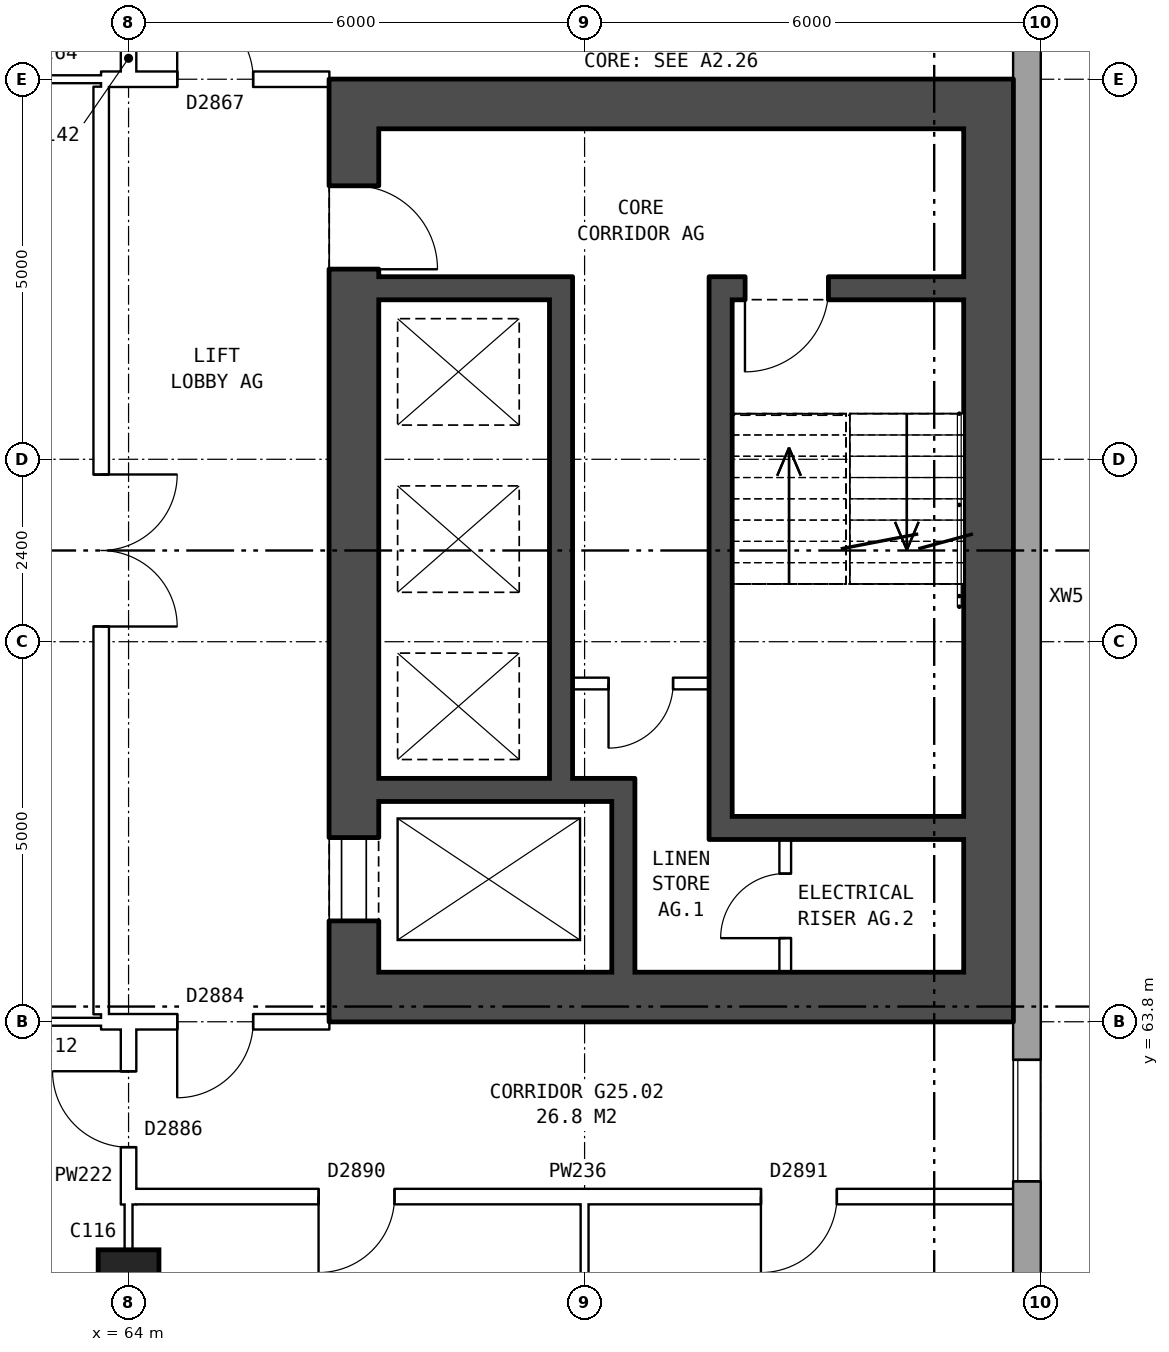
"""IFC4 building model, lengths in metres.
Left out: names, types, materials, properties, quantities, classifications, styles, units other than length and angle.
Written with IfcOpenShell. Run it as: python <this file> out.ifc"""

import sys

from ifc_helpers import new_model, si_unit, direction, frame, frame_2d, origin, origin_2d, place, context, subcontext, project, spatial, rectangle, extrude, element, fill, save


model = new_model("IFC4")
c1 = context("Model", 3, precision=1e-05, world=origin(), true_north=direction((0.0, 1.0)))
c2 = subcontext(c1, "Body", "Model", "MODEL_VIEW")
j1 = project(units=[si_unit("LENGTHUNIT", "METRE"), si_unit("PLANEANGLEUNIT", "RADIAN")], contexts=[c1])
p1 = place(None, origin())
s1 = spatial("IfcSite", under=j1, at=p1, CompositionType="ELEMENT")
p2 = place(p1, origin())
s2 = spatial("IfcBuilding", under=s1, at=p2, CompositionType="ELEMENT")
p3 = place(p2, frame((0.0, 0.0, 90.2)))
s3 = spatial("IfcBuildingStorey", under=s2, at=p3, CompositionType="ELEMENT", Elevation=90.2)
p4 = place(p3, frame((64.0, 60.4, 0.0), z_axis=(0.0, 0.0, 1.0), x_axis=(1.0, 0.0, 0.0)))
e1 = element("IfcColumn", 1, at=p4, inside=s3, PredefinedType="COLUMN", context=c2, shape_type="SweptSolid", body=[
    extrude(rectangle(XDim=0.8, YDim=0.8, at=origin_2d()), origin(), (0.0, 0.0, 1.0), 5.6),
])
p5 = place(p3, frame((75.82, 57.075, 0.0), z_axis=(0.0, 0.0, 1.0), x_axis=(0.0, 1.0, 0.0)))
e2 = element("IfcWall", 2, at=p5, inside=s3, PredefinedType="STANDARD", context=c2, shape_type="SweptSolid", body=[
    extrude(rectangle(XDim=25.851, YDim=0.36, at=frame_2d((12.925, 0.0))), origin(), (0.0, 0.0, 1.0), 5.6),
])
p6 = place(p5, frame((1.625, 0.0, 0.15)))
e3 = element("IfcOpeningElement", 3, at=p6, cuts=e2, PredefinedType="OPENING", context=c2, shape_type="SweptSolid", body=[
    extrude(rectangle(XDim=1.6, YDim=2.4, at=frame_2d((0.8, 1.2))), frame((0.0, 0.19, 0.0), z_axis=(0.0, -1.0, 0.0), x_axis=(1.0, 0.0, 0.0)), (0.0, 0.0, 1.0), 0.38),
])
p7 = place(p5, frame((4.625, 0.0, 0.15)))
e4 = element("IfcOpeningElement", 4, at=p7, cuts=e2, PredefinedType="OPENING", context=c2, shape_type="SweptSolid", body=[
    extrude(rectangle(XDim=1.6, YDim=2.4, at=frame_2d((0.8, 1.2))), frame((0.0, 0.19, 0.0), z_axis=(0.0, -1.0, 0.0), x_axis=(1.0, 0.0, 0.0)), (0.0, 0.0, 1.0), 0.38),
])
p8 = place(p5, frame((19.625, 0.0, 0.15)))
e5 = element("IfcOpeningElement", 5, at=p8, cuts=e2, PredefinedType="OPENING", context=c2, shape_type="SweptSolid", body=[
    extrude(rectangle(XDim=1.6, YDim=2.4, at=frame_2d((0.8, 1.2))), frame((0.0, 0.19, 0.0), z_axis=(0.0, -1.0, 0.0), x_axis=(1.0, 0.0, 0.0)), (0.0, 0.0, 1.0), 0.38),
])
p9 = place(p5, frame((22.625, 0.0, 0.15)))
e6 = element("IfcOpeningElement", 6, at=p9, cuts=e2, PredefinedType="OPENING", context=c2, shape_type="SweptSolid", body=[
    extrude(rectangle(XDim=1.6, YDim=2.4, at=frame_2d((0.8, 1.2))), frame((0.0, 0.19, 0.0), z_axis=(0.0, -1.0, 0.0), x_axis=(1.0, 0.0, 0.0)), (0.0, 0.0, 1.0), 0.38),
])
p10 = place(p3, frame((66.965, 64.45, 0.0), z_axis=(0.0, 0.0, 1.0), x_axis=(0.0, 1.0, 0.0)))
e7 = element("IfcWall", 7, at=p10, inside=s3, PredefinedType="SHEAR", context=c2, shape_type="SweptSolid", body=[
    extrude(rectangle(XDim=11.1, YDim=0.65, at=frame_2d((5.55, 0.0))), origin(), (0.0, 0.0, 1.0), 5.6),
])
p11 = place(p10, frame((0.675, 0.0, 0.0)))
e8 = element("IfcOpeningElement", 8, at=p11, cuts=e7, PredefinedType="OPENING", context=c2, shape_type="SweptSolid", body=[
    extrude(rectangle(XDim=1.1, YDim=2.1, at=frame_2d((0.55, 1.05))), frame((0.0, 0.335, 0.0), z_axis=(0.0, -1.0, 0.0), x_axis=(1.0, 0.0, 0.0)), (0.0, 0.0, 1.0), 0.67),
])
p12 = place(p10, frame((9.25, 0.0, 0.0)))
e9 = element("IfcOpeningElement", 9, at=p12, cuts=e7, PredefinedType="OPENING", context=c2, shape_type="SweptSolid", body=[
    extrude(rectangle(XDim=1.1, YDim=2.1, at=frame_2d((0.55, 1.05))), frame((0.0, 0.335, 0.0), z_axis=(0.0, -1.0, 0.0), x_axis=(1.0, 0.0, 0.0)), (0.0, 0.0, 1.0), 0.67),
])
p13 = place(p3, frame((75.315, 64.45, 0.0), z_axis=(0.0, 0.0, 1.0), x_axis=(0.0, 1.0, 0.0)))
e10 = element("IfcWall", 10, at=p13, inside=s3, PredefinedType="SHEAR", context=c2, shape_type="SweptSolid", body=[
    extrude(rectangle(XDim=11.1, YDim=0.65, at=frame_2d((5.55, 0.0))), origin(), (0.0, 0.0, 1.0), 5.6),
])
for number, where, z_axis, x_axis in (
    (11, (66.64, 64.125, 0.0), (0.0, 0.0, 1.0), (1.0, 0.0, 0.0)),
    (12, (66.64, 75.875, 0.0), (0.0, 0.0, 1.0), (1.0, 0.0, 0.0)),
):
    element("IfcWall", number, at=place(p3, frame(where, z_axis=z_axis, x_axis=x_axis)), inside=s3, PredefinedType="SHEAR", context=c2, shape_type="SweptSolid", body=[
        extrude(rectangle(XDim=9.0, YDim=0.65, at=frame_2d((4.5, 0.0))), origin(), (0.0, 0.0, 1.0), 5.6),
    ])
p14 = place(p3, frame((71.94, 66.35, 0.0), z_axis=(0.0, 0.0, 1.0), x_axis=(1.0, 0.0, 0.0)))
e13 = element("IfcWall", 13, at=p14, inside=s3, PredefinedType="SHEAR", context=c2, shape_type="SweptSolid", body=[
    extrude(rectangle(XDim=3.05, YDim=0.3, at=frame_2d((1.525, 0.0))), origin(), (0.0, 0.0, 1.0), 5.6),
])
p15 = place(p3, frame((67.29, 66.85, 0.0), z_axis=(0.0, 0.0, 1.0), x_axis=(1.0, 0.0, 0.0)))
e14 = element("IfcWall", 14, at=p15, inside=s3, PredefinedType="SHEAR", context=c2, shape_type="SweptSolid", body=[
    extrude(rectangle(XDim=3.37, YDim=0.3, at=frame_2d((1.685, 0.0))), origin(), (0.0, 0.0, 1.0), 5.6),
])
p16 = place(p3, frame((69.84, 68.25, 0.0), z_axis=(0.0, 0.0, 1.0), x_axis=(1.0, 0.0, 0.0)))
e15 = element("IfcWall", 15, at=p16, inside=s3, PredefinedType="PARTITIONING", context=c2, shape_type="SweptSolid", body=[
    extrude(rectangle(XDim=1.8, YDim=0.15, at=frame_2d((0.9, 0.0))), origin(), (0.0, 0.0, 1.0), 5.6),
])
p17 = place(p16, frame((0.475, 0.0, 0.0)))
e16 = element("IfcOpeningElement", 16, at=p17, cuts=e15, PredefinedType="OPENING", context=c2, shape_type="SweptSolid", body=[
    extrude(rectangle(XDim=0.85, YDim=2.1, at=frame_2d((0.425, 1.05))), frame((0.0, 0.085, 0.0), z_axis=(0.0, -1.0, 0.0), x_axis=(1.0, 0.0, 0.0)), (0.0, 0.0, 1.0), 0.17),
])
p18 = place(p3, frame((67.29, 73.45, 0.0), z_axis=(0.0, 0.0, 1.0), x_axis=(1.0, 0.0, 0.0)))
e17 = element("IfcWall", 17, at=p18, inside=s3, PredefinedType="SHEAR", context=c2, shape_type="SweptSolid", body=[
    extrude(rectangle(XDim=2.25, YDim=0.3, at=frame_2d((1.125, 0.0))), origin(), (0.0, 0.0, 1.0), 5.6),
])
p19 = place(p3, frame((71.94, 73.45, 0.0), z_axis=(0.0, 0.0, 1.0), x_axis=(1.0, 0.0, 0.0)))
e18 = element("IfcWall", 18, at=p19, inside=s3, PredefinedType="SHEAR", context=c2, shape_type="SweptSolid", body=[
    extrude(rectangle(XDim=3.05, YDim=0.3, at=frame_2d((1.525, 0.0))), origin(), (0.0, 0.0, 1.0), 5.6),
])
p20 = place(p19, frame((0.17, 0.0, 0.0)))
e19 = element("IfcOpeningElement", 19, at=p20, cuts=e18, PredefinedType="OPENING", context=c2, shape_type="SweptSolid", body=[
    extrude(rectangle(XDim=1.1, YDim=2.1, at=frame_2d((0.55, 1.05))), frame((0.0, 0.16, 0.0), z_axis=(0.0, -1.0, 0.0), x_axis=(1.0, 0.0, 0.0)), (0.0, 0.0, 1.0), 0.32),
])
p21 = place(p3, frame((69.69, 67.0, 0.0), z_axis=(0.0, 0.0, 1.0), x_axis=(0.0, 1.0, 0.0)))
e20 = element("IfcWall", 20, at=p21, inside=s3, PredefinedType="SHEAR", context=c2, shape_type="SweptSolid", body=[
    extrude(rectangle(XDim=6.6, YDim=0.3, at=frame_2d((3.3, 0.0))), origin(), (0.0, 0.0, 1.0), 5.6),
])
p22 = place(p3, frame((70.51, 64.45, 0.0), z_axis=(0.0, 0.0, 1.0), x_axis=(0.0, 1.0, 0.0)))
e21 = element("IfcWall", 21, at=p22, inside=s3, PredefinedType="SHEAR", context=c2, shape_type="SweptSolid", body=[
    extrude(rectangle(XDim=2.25, YDim=0.3, at=frame_2d((1.125, 0.0))), origin(), (0.0, 0.0, 1.0), 5.6),
])
p23 = place(p3, frame((71.79, 66.2, 0.0), z_axis=(0.0, 0.0, 1.0), x_axis=(0.0, 1.0, 0.0)))
e22 = element("IfcWall", 22, at=p23, inside=s3, PredefinedType="SHEAR", context=c2, shape_type="SweptSolid", body=[
    extrude(rectangle(XDim=7.4, YDim=0.3, at=frame_2d((3.7, 0.0))), origin(), (0.0, 0.0, 1.0), 5.6),
])
p24 = place(p3, frame((72.64, 64.45, 0.0), z_axis=(0.0, 0.0, 1.0), x_axis=(0.0, 1.0, 0.0)))
e23 = element("IfcWall", 23, at=p24, inside=s3, PredefinedType="PARTITIONING", context=c2, shape_type="SweptSolid", body=[
    extrude(rectangle(XDim=1.75, YDim=0.15, at=frame_2d((0.875, 0.0))), origin(), (0.0, 0.0, 1.0), 5.6),
])
p25 = place(p24, frame((0.45, 0.0, 0.0)))
e24 = element("IfcOpeningElement", 24, at=p25, cuts=e23, PredefinedType="OPENING", context=c2, shape_type="SweptSolid", body=[
    extrude(rectangle(XDim=0.85, YDim=2.1, at=frame_2d((0.425, 1.05))), frame((0.0, 0.085, 0.0), z_axis=(0.0, -1.0, 0.0), x_axis=(1.0, 0.0, 0.0)), (0.0, 0.0, 1.0), 0.17),
])
p26 = place(p3, frame((63.64, 63.9, 0.0), z_axis=(0.0, 0.0, 1.0), x_axis=(0.0, 1.0, 0.0)))
e25 = element("IfcWall", 25, at=p26, inside=s3, PredefinedType="PARTITIONING", context=c2, shape_type="SweptSolid", body=[
    extrude(rectangle(XDim=12.2, YDim=0.2, at=frame_2d((6.1, 0.0))), origin(), (0.0, 0.0, 1.0), 5.6),
])
p27 = place(p26, frame((5.1, 0.0, 0.0)))
e26 = element("IfcOpeningElement", 26, at=p27, cuts=e25, PredefinedType="OPENING", context=c2, shape_type="SweptSolid", body=[
    extrude(rectangle(XDim=2.0, YDim=2.1, at=frame_2d((1.0, 1.05))), frame((0.0, 0.11, 0.0), z_axis=(0.0, -1.0, 0.0), x_axis=(1.0, 0.0, 0.0)), (0.0, 0.0, 1.0), 0.22),
])
p28 = place(p3, frame((63.9, 61.5, 0.0), z_axis=(0.0, 0.0, 1.0), x_axis=(1.0, 0.0, 0.0)))
e27 = element("IfcWall", 27, at=p28, inside=s3, PredefinedType="PARTITIONING", context=c2, shape_type="SweptSolid", body=[
    extrude(rectangle(XDim=11.86, YDim=0.2, at=frame_2d((5.93, 0.0))), origin(), (0.0, 0.0, 1.0), 5.6),
])
p29 = place(p28, frame((2.6, 0.0, 0.0)))
e28 = element("IfcOpeningElement", 28, at=p29, cuts=e27, PredefinedType="OPENING", context=c2, shape_type="SweptSolid", body=[
    extrude(rectangle(XDim=1.0, YDim=2.1, at=frame_2d((0.5, 1.05))), frame((0.0, 0.11, 0.0), z_axis=(0.0, -1.0, 0.0), x_axis=(1.0, 0.0, 0.0)), (0.0, 0.0, 1.0), 0.22),
])
p30 = place(p28, frame((8.42, 0.0, 0.0)))
e29 = element("IfcOpeningElement", 29, at=p30, cuts=e27, PredefinedType="OPENING", context=c2, shape_type="SweptSolid", body=[
    extrude(rectangle(XDim=1.0, YDim=2.1, at=frame_2d((0.5, 1.05))), frame((0.0, 0.11, 0.0), z_axis=(0.0, -1.0, 0.0), x_axis=(1.0, 0.0, 0.0)), (0.0, 0.0, 1.0), 0.22),
])
p31 = place(p3, frame((63.64, 63.8, 0.0), z_axis=(0.0, 0.0, 1.0), x_axis=(1.0, 0.0, 0.0)))
e30 = element("IfcWall", 30, at=p31, inside=s3, PredefinedType="PARTITIONING", context=c2, shape_type="SweptSolid", body=[
    extrude(rectangle(XDim=3.0, YDim=0.2, at=frame_2d((1.5, 0.0))), origin(), (0.0, 0.0, 1.0), 5.6),
])
p32 = place(p31, frame((1.0, 0.0, 0.0)))
e31 = element("IfcOpeningElement", 31, at=p32, cuts=e30, PredefinedType="OPENING", context=c2, shape_type="SweptSolid", body=[
    extrude(rectangle(XDim=1.0, YDim=2.1, at=frame_2d((0.5, 1.05))), frame((0.0, 0.11, 0.0), z_axis=(0.0, -1.0, 0.0), x_axis=(1.0, 0.0, 0.0)), (0.0, 0.0, 1.0), 0.22),
])
p33 = place(p3, frame((44.26, 63.8, 0.0), z_axis=(0.0, 0.0, 1.0), x_axis=(1.0, 0.0, 0.0)))
e32 = element("IfcWall", 32, at=p33, inside=s3, PredefinedType="PARTITIONING", context=c2, shape_type="SweptSolid", body=[
    extrude(rectangle(XDim=19.38, YDim=0.1, at=frame_2d((9.69, 0.0))), origin(), (0.0, 0.0, 1.0), 5.6),
])
p34 = place(p33, frame((4.42, 0.0, 0.0)))
e33 = element("IfcOpeningElement", 33, at=p34, cuts=e32, PredefinedType="OPENING", context=c2, shape_type="SweptSolid", body=[
    extrude(rectangle(XDim=1.0, YDim=2.1, at=frame_2d((0.5, 1.05))), frame((0.0, 0.06, 0.0), z_axis=(0.0, -1.0, 0.0), x_axis=(1.0, 0.0, 0.0)), (0.0, 0.0, 1.0), 0.12),
])
p35 = place(p33, frame((14.06, 0.0, 0.0)))
e34 = element("IfcOpeningElement", 34, at=p35, cuts=e32, PredefinedType="OPENING", context=c2, shape_type="SweptSolid", body=[
    extrude(rectangle(XDim=1.0, YDim=2.1, at=frame_2d((0.5, 1.05))), frame((0.0, 0.06, 0.0), z_axis=(0.0, -1.0, 0.0), x_axis=(1.0, 0.0, 0.0)), (0.0, 0.0, 1.0), 0.12),
])
p36 = place(p3, frame((63.64, 76.2, 0.0), z_axis=(0.0, 0.0, 1.0), x_axis=(1.0, 0.0, 0.0)))
e35 = element("IfcWall", 35, at=p36, inside=s3, PredefinedType="PARTITIONING", context=c2, shape_type="SweptSolid", body=[
    extrude(rectangle(XDim=3.0, YDim=0.2, at=frame_2d((1.5, 0.0))), origin(), (0.0, 0.0, 1.0), 5.6),
])
p37 = place(p36, frame((1.0, 0.0, 0.0)))
e36 = element("IfcOpeningElement", 36, at=p37, cuts=e35, PredefinedType="OPENING", context=c2, shape_type="SweptSolid", body=[
    extrude(rectangle(XDim=1.0, YDim=2.1, at=frame_2d((0.5, 1.05))), frame((0.0, 0.11, 0.0), z_axis=(0.0, -1.0, 0.0), x_axis=(1.0, 0.0, 0.0)), (0.0, 0.0, 1.0), 0.22),
])
p38 = place(p3, frame((44.26, 76.2, 0.0), z_axis=(0.0, 0.0, 1.0), x_axis=(1.0, 0.0, 0.0)))
e37 = element("IfcWall", 37, at=p38, inside=s3, PredefinedType="PARTITIONING", context=c2, shape_type="SweptSolid", body=[
    extrude(rectangle(XDim=19.38, YDim=0.1, at=frame_2d((9.69, 0.0))), origin(), (0.0, 0.0, 1.0), 5.6),
])
p39 = place(p38, frame((4.42, 0.0, 0.0)))
e38 = element("IfcOpeningElement", 38, at=p39, cuts=e37, PredefinedType="OPENING", context=c2, shape_type="SweptSolid", body=[
    extrude(rectangle(XDim=1.0, YDim=2.1, at=frame_2d((0.5, 1.05))), frame((0.0, 0.06, 0.0), z_axis=(0.0, -1.0, 0.0), x_axis=(1.0, 0.0, 0.0)), (0.0, 0.0, 1.0), 0.12),
])
p40 = place(p38, frame((14.06, 0.0, 0.0)))
e39 = element("IfcOpeningElement", 39, at=p40, cuts=e37, PredefinedType="OPENING", context=c2, shape_type="SweptSolid", body=[
    extrude(rectangle(XDim=1.0, YDim=2.1, at=frame_2d((0.5, 1.05))), frame((0.0, 0.06, 0.0), z_axis=(0.0, -1.0, 0.0), x_axis=(1.0, 0.0, 0.0)), (0.0, 0.0, 1.0), 0.12),
])
p41 = place(p3, frame((64.0, 61.398, 0.0), z_axis=(0.0, 0.0, 1.0), x_axis=(0.0, 1.0, 0.0)))
e40 = element("IfcWall", 40, at=p41, inside=s3, PredefinedType="PARTITIONING", context=c2, shape_type="SweptSolid", body=[
    extrude(rectangle(XDim=2.502, YDim=0.2, at=frame_2d((1.251, 0.0))), origin(), (0.0, 0.0, 1.0), 5.6),
])
p42 = place(p41, frame((0.751, 0.0, 0.0)))
e41 = element("IfcOpeningElement", 41, at=p42, cuts=e40, PredefinedType="OPENING", context=c2, shape_type="SweptSolid", body=[
    extrude(rectangle(XDim=1.0, YDim=2.1, at=frame_2d((0.5, 1.05))), frame((0.0, 0.11, 0.0), z_axis=(0.0, -1.0, 0.0), x_axis=(1.0, 0.0, 0.0)), (0.0, 0.0, 1.0), 0.22),
])
p43 = place(p3, frame((64.0, 76.1, 0.0), z_axis=(0.0, 0.0, 1.0), x_axis=(0.0, 1.0, 0.0)))
e42 = element("IfcWall", 42, at=p43, inside=s3, PredefinedType="PARTITIONING", context=c2, shape_type="SweptSolid", body=[
    extrude(rectangle(XDim=2.502, YDim=0.2, at=frame_2d((1.251, 0.0))), origin(), (0.0, 0.0, 1.0), 5.6),
])
p44 = place(p43, frame((0.751, 0.0, 0.0)))
e43 = element("IfcOpeningElement", 43, at=p44, cuts=e42, PredefinedType="OPENING", context=c2, shape_type="SweptSolid", body=[
    extrude(rectangle(XDim=1.0, YDim=2.1, at=frame_2d((0.5, 1.05))), frame((0.0, 0.11, 0.0), z_axis=(0.0, -1.0, 0.0), x_axis=(1.0, 0.0, 0.0)), (0.0, 0.0, 1.0), 0.22),
])
p45 = place(p3, frame((64.0, 54.24, 0.0), z_axis=(0.0, 0.0, 1.0), x_axis=(0.0, 1.0, 0.0)))
e44 = element("IfcWall", 44, at=p45, inside=s3, PredefinedType="PARTITIONING", context=c2, shape_type="SweptSolid", body=[
    extrude(rectangle(XDim=7.362, YDim=0.1, at=frame_2d((3.681, 0.0))), origin(), (0.0, 0.0, 1.0), 5.6),
])
p46 = place(p3, frame((70.0, 54.24, 0.0), z_axis=(0.0, 0.0, 1.0), x_axis=(0.0, 1.0, 0.0)))
e45 = element("IfcWall", 45, at=p46, inside=s3, PredefinedType="PARTITIONING", context=c2, shape_type="SweptSolid", body=[
    extrude(rectangle(XDim=7.36, YDim=0.1, at=frame_2d((3.68, 0.0))), origin(), (0.0, 0.0, 1.0), 5.6),
])
p47 = place(p7, origin())
e46 = element("IfcWindow", 46, at=p47, inside=s3, PartitioningType="SINGLE_PANEL", PredefinedType="WINDOW", context=c2, shape_type="SweptSolid", body=[
    extrude(rectangle(XDim=1.6, YDim=2.4, at=frame_2d((0.8, 1.2))), frame((0.0, 0.15, 0.0), z_axis=(0.0, -1.0, 0.0), x_axis=(1.0, 0.0, 0.0)), (0.0, 0.0, 1.0), 0.06),
])
fill(e4, e46)
p48 = place(p11, origin())
e47 = element("IfcDoor", 47, at=p48, inside=s3, OperationType="DOUBLE_DOOR_SLIDING", PredefinedType="DOOR", context=c2, shape_type="SweptSolid", body=[
    extrude(rectangle(XDim=1.1, YDim=2.1, at=frame_2d((0.55, 1.05))), frame((0.0, -0.26, 0.0), z_axis=(0.0, -1.0, 0.0), x_axis=(1.0, 0.0, 0.0)), (0.0, 0.0, 1.0), 0.05),
])
fill(e8, e47)
p49 = place(p12, frame((1.1, 0.0, 0.0), z_axis=(0.0, 0.0, 1.0), x_axis=(-1.0, 0.0, 0.0)))
e48 = element("IfcDoor", 48, at=p49, inside=s3, OperationType="SINGLE_SWING_RIGHT", PredefinedType="DOOR", context=c2, shape_type="SweptSolid", body=[
    extrude(rectangle(XDim=1.1, YDim=2.1, at=frame_2d((0.55, 1.05))), frame((0.0, 0.31, 0.0), z_axis=(0.0, -1.0, 0.0), x_axis=(1.0, 0.0, 0.0)), (0.0, 0.0, 1.0), 0.05),
])
fill(e9, e48)
p50 = place(p20, frame((1.1, 0.0, 0.0), z_axis=(0.0, 0.0, 1.0), x_axis=(-1.0, 0.0, 0.0)))
e49 = element("IfcDoor", 49, at=p50, inside=s3, OperationType="SINGLE_SWING_RIGHT", PredefinedType="DOOR", context=c2, shape_type="SweptSolid", body=[
    extrude(rectangle(XDim=1.1, YDim=2.1, at=frame_2d((0.55, 1.05))), frame((0.0, 0.025, 0.0), z_axis=(0.0, -1.0, 0.0), x_axis=(1.0, 0.0, 0.0)), (0.0, 0.0, 1.0), 0.05),
])
fill(e19, e49)
p51 = place(p17, frame((0.85, 0.0, 0.0), z_axis=(0.0, 0.0, 1.0), x_axis=(-1.0, 0.0, 0.0)))
e50 = element("IfcDoor", 50, at=p51, inside=s3, OperationType="SINGLE_SWING_RIGHT", PredefinedType="DOOR", context=c2, shape_type="SweptSolid", body=[
    extrude(rectangle(XDim=0.85, YDim=2.1, at=frame_2d((0.425, 1.05))), frame((0.0, 0.025, 0.0), z_axis=(0.0, -1.0, 0.0), x_axis=(1.0, 0.0, 0.0)), (0.0, 0.0, 1.0), 0.05),
])
fill(e16, e50)
p52 = place(p25, origin())
e51 = element("IfcDoor", 51, at=p52, inside=s3, OperationType="SINGLE_SWING_LEFT", PredefinedType="DOOR", context=c2, shape_type="SweptSolid", body=[
    extrude(rectangle(XDim=0.85, YDim=2.1, at=frame_2d((0.425, 1.05))), frame((0.0, 0.025, 0.0), z_axis=(0.0, -1.0, 0.0), x_axis=(1.0, 0.0, 0.0)), (0.0, 0.0, 1.0), 0.05),
])
fill(e24, e51)
p53 = place(p27, frame((2.0, 0.0, 0.0), z_axis=(0.0, 0.0, 1.0), x_axis=(-1.0, 0.0, 0.0)))
e52 = element("IfcDoor", 52, at=p53, inside=s3, OperationType="DOUBLE_DOOR_SINGLE_SWING", PredefinedType="DOOR", context=c2, shape_type="SweptSolid", body=[
    extrude(rectangle(XDim=2.0, YDim=2.1, at=frame_2d((1.0, 1.05))), frame((0.0, 0.025, 0.0), z_axis=(0.0, -1.0, 0.0), x_axis=(1.0, 0.0, 0.0)), (0.0, 0.0, 1.0), 0.05),
])
fill(e26, e52)
p54 = place(p29, frame((1.0, 0.0, 0.0), z_axis=(0.0, 0.0, 1.0), x_axis=(-1.0, 0.0, 0.0)))
e53 = element("IfcDoor", 53, at=p54, inside=s3, OperationType="SINGLE_SWING_RIGHT", PredefinedType="DOOR", context=c2, shape_type="SweptSolid", body=[
    extrude(rectangle(XDim=1.0, YDim=2.1, at=frame_2d((0.5, 1.05))), frame((0.0, 0.025, 0.0), z_axis=(0.0, -1.0, 0.0), x_axis=(1.0, 0.0, 0.0)), (0.0, 0.0, 1.0), 0.05),
])
fill(e28, e53)
p55 = place(p30, frame((1.0, 0.0, 0.0), z_axis=(0.0, 0.0, 1.0), x_axis=(-1.0, 0.0, 0.0)))
e54 = element("IfcDoor", 54, at=p55, inside=s3, OperationType="SINGLE_SWING_RIGHT", PredefinedType="DOOR", context=c2, shape_type="SweptSolid", body=[
    extrude(rectangle(XDim=1.0, YDim=2.1, at=frame_2d((0.5, 1.05))), frame((0.0, 0.025, 0.0), z_axis=(0.0, -1.0, 0.0), x_axis=(1.0, 0.0, 0.0)), (0.0, 0.0, 1.0), 0.05),
])
fill(e29, e54)
p56 = place(p32, frame((1.0, 0.0, 0.0), z_axis=(0.0, 0.0, 1.0), x_axis=(-1.0, 0.0, 0.0)))
e55 = element("IfcDoor", 55, at=p56, inside=s3, OperationType="SINGLE_SWING_RIGHT", PredefinedType="DOOR", context=c2, shape_type="SweptSolid", body=[
    extrude(rectangle(XDim=1.0, YDim=2.1, at=frame_2d((0.5, 1.05))), frame((0.0, 0.025, 0.0), z_axis=(0.0, -1.0, 0.0), x_axis=(1.0, 0.0, 0.0)), (0.0, 0.0, 1.0), 0.05),
])
fill(e31, e55)
p57 = place(p37, origin())
e56 = element("IfcDoor", 56, at=p57, inside=s3, OperationType="SINGLE_SWING_LEFT", PredefinedType="DOOR", context=c2, shape_type="SweptSolid", body=[
    extrude(rectangle(XDim=1.0, YDim=2.1, at=frame_2d((0.5, 1.05))), frame((0.0, 0.025, 0.0), z_axis=(0.0, -1.0, 0.0), x_axis=(1.0, 0.0, 0.0)), (0.0, 0.0, 1.0), 0.05),
])
fill(e36, e56)
p58 = place(p42, origin())
e57 = element("IfcDoor", 57, at=p58, inside=s3, OperationType="SINGLE_SWING_RIGHT", PredefinedType="DOOR", context=c2, shape_type="SweptSolid", body=[
    extrude(rectangle(XDim=1.0, YDim=2.1, at=frame_2d((0.5, 1.05))), frame((0.0, 0.025, 0.0), z_axis=(0.0, -1.0, 0.0), x_axis=(1.0, 0.0, 0.0)), (0.0, 0.0, 1.0), 0.05),
])
fill(e41, e57)
save(model, sys.argv[1])
